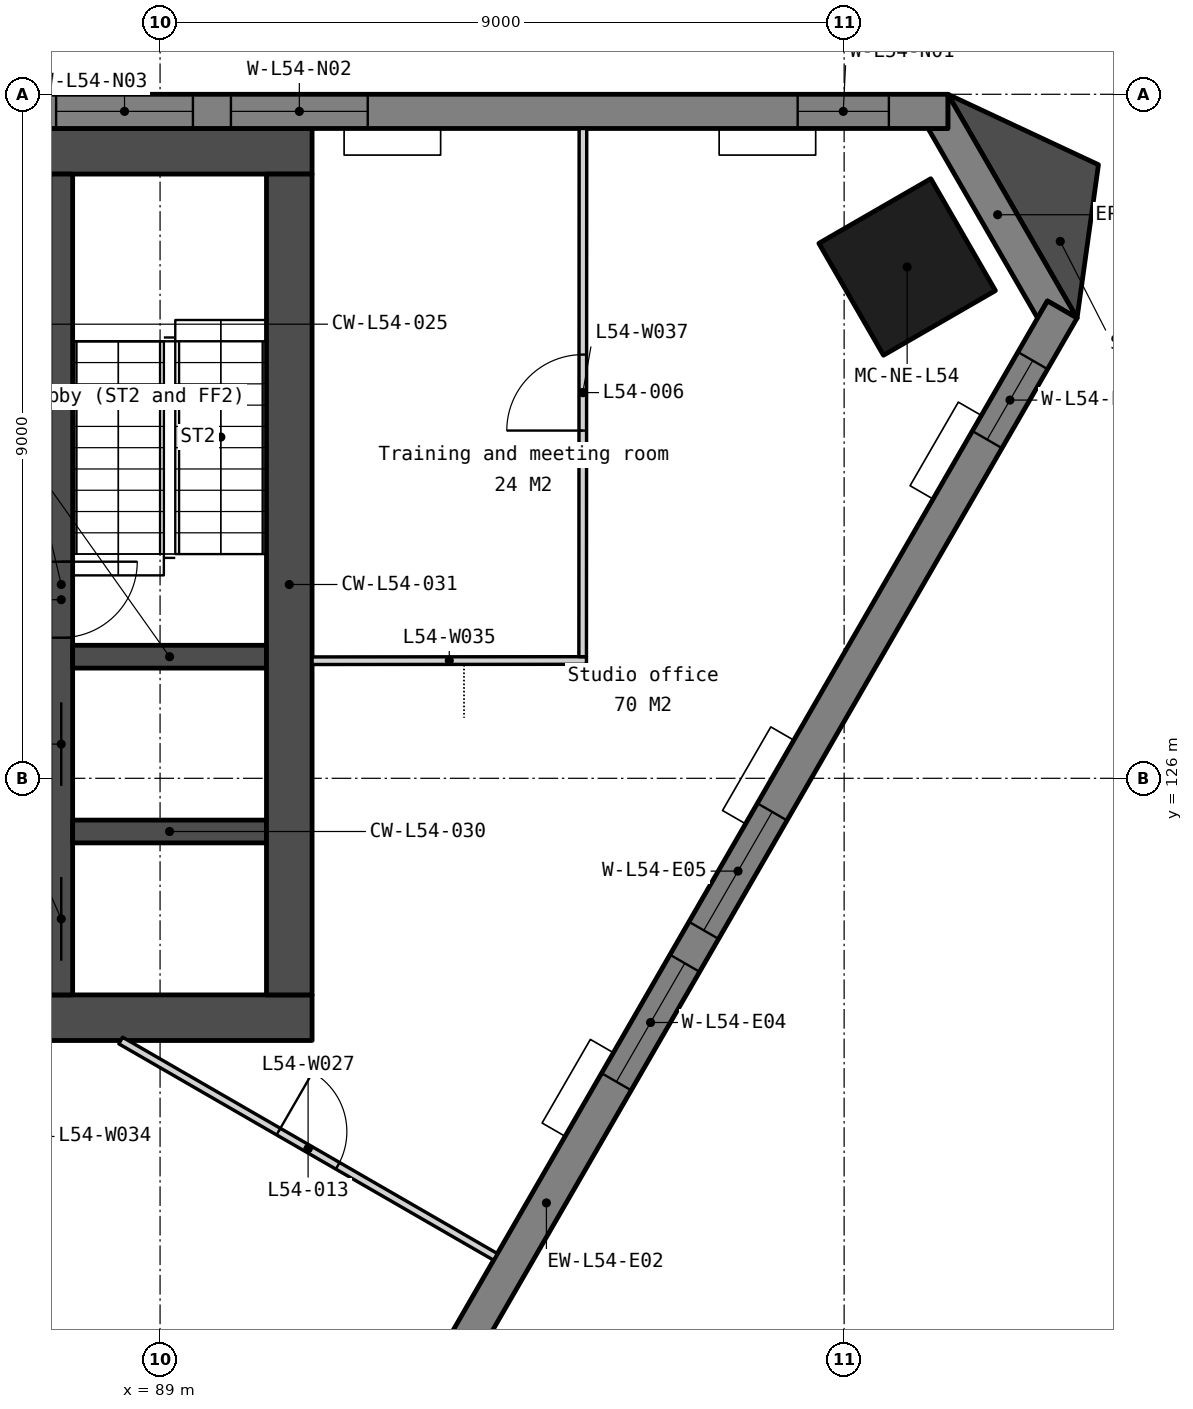
"""IFC4 building model, lengths in metres.
Left out: names, types, materials, properties, quantities, classifications, styles, units other than length and angle.
Written with IfcOpenShell. Run it as: python <this file> out.ifc"""

import sys

from ifc_helpers import new_model, si_unit, direction, frame, frame_2d, origin, origin_2d, place, context, subcontext, project, spatial, polyline, rectangle, outline, extrude, element, fill, save


model = new_model("IFC4")
c1 = context("Model", 3, precision=1e-05, world=origin(), true_north=direction((0.0, 1.0)))
c2 = subcontext(c1, "Body", "Model", "MODEL_VIEW")
j1 = project(units=[si_unit("LENGTHUNIT", "METRE"), si_unit("PLANEANGLEUNIT", "RADIAN")], contexts=[c1])
p1 = place(None, origin())
s1 = spatial("IfcSite", under=j1, at=p1, CompositionType="ELEMENT")
p2 = place(p1, origin())
s2 = spatial("IfcBuilding", under=s1, at=p2, CompositionType="ELEMENT")
p3 = place(p2, frame((0.0, 0.0, 215.3)))
s3 = spatial("IfcBuildingStorey", under=s2, at=p3, CompositionType="ELEMENT", Elevation=215.3)
p4 = place(p3, frame((98.829, 132.728, 0.0), z_axis=(0.0, 0.0, 1.0), x_axis=(-0.5, 0.866025403784, 0.0)))
e1 = element("IfcColumn", 1, at=p4, inside=s3, PredefinedType="COLUMN", context=c2, shape_type="SweptSolid", body=[
    extrude(rectangle(XDim=1.7, YDim=1.7, at=origin_2d()), origin(), (0.0, 0.0, 1.0), 3.9),
])
p5 = place(p3, frame((69.0, 134.25, 0.0), z_axis=(0.0, 0.0, 1.0), x_axis=(1.0, 0.0, 0.0)))
e2 = element("IfcWall", 2, at=p5, inside=s3, PredefinedType="SOLIDWALL", context=c2, shape_type="SweptSolid", body=[
    extrude(rectangle(XDim=22.0, YDim=0.6, at=frame_2d((11.0, 0.0))), origin(), (0.0, 0.0, 1.0), 3.75),
])
p6 = place(p3, frame((69.0, 122.85, 0.0), z_axis=(0.0, 0.0, 1.0), x_axis=(1.0, 0.0, 0.0)))
e3 = element("IfcWall", 3, at=p6, inside=s3, PredefinedType="SOLIDWALL", context=c2, shape_type="SweptSolid", body=[
    extrude(rectangle(XDim=22.0, YDim=0.6, at=frame_2d((11.0, 0.0))), origin(), (0.0, 0.0, 1.0), 3.75),
])
p7 = place(p6, frame((16.375, 0.0, 0.0)))
e4 = element("IfcOpeningElement", 4, at=p7, cuts=e3, PredefinedType="OPENING", context=c2, shape_type="SweptSolid", body=[
    extrude(rectangle(XDim=1.8, YDim=2.1, at=frame_2d((0.9, 1.05))), frame((0.0, 0.31, 0.0), z_axis=(0.0, -1.0, 0.0), x_axis=(1.0, 0.0, 0.0)), (0.0, 0.0, 1.0), 0.62),
])
p8 = place(p6, frame((3.825, 0.0, 0.0)))
e5 = element("IfcOpeningElement", 5, at=p8, cuts=e3, PredefinedType="OPENING", context=c2, shape_type="SweptSolid", body=[
    extrude(rectangle(XDim=1.8, YDim=2.1, at=frame_2d((0.9, 1.05))), frame((0.0, 0.31, 0.0), z_axis=(0.0, -1.0, 0.0), x_axis=(1.0, 0.0, 0.0)), (0.0, 0.0, 1.0), 0.62),
])
p9 = place(p6, frame((12.85, 0.0, 0.0)))
e6 = element("IfcOpeningElement", 6, at=p9, cuts=e3, PredefinedType="OPENING", context=c2, shape_type="SweptSolid", body=[
    extrude(rectangle(XDim=1.5, YDim=2.1, at=frame_2d((0.75, 1.05))), frame((0.0, 0.31, 0.0), z_axis=(0.0, -1.0, 0.0), x_axis=(1.0, 0.0, 0.0)), (0.0, 0.0, 1.0), 0.62),
])
p10 = place(p3, frame((87.7, 133.95, 0.0), z_axis=(0.0, 0.0, 1.0), x_axis=(0.0, -1.0, 0.0)))
e7 = element("IfcWall", 7, at=p10, inside=s3, PredefinedType="SOLIDWALL", context=c2, shape_type="SweptSolid", body=[
    extrude(rectangle(XDim=10.8, YDim=0.3, at=frame_2d((5.4, 0.0))), origin(), (0.0, 0.0, 1.0), 3.75),
])
p11 = place(p10, frame((6.95, 0.0, 0.0)))
e8 = element("IfcOpeningElement", 8, at=p11, cuts=e7, PredefinedType="OPENING", context=c2, shape_type="SweptSolid", body=[
    extrude(rectangle(XDim=1.1, YDim=2.1, at=frame_2d((0.55, 1.05))), frame((0.0, 0.16, 0.0), z_axis=(0.0, -1.0, 0.0), x_axis=(1.0, 0.0, 0.0)), (0.0, 0.0, 1.0), 0.32),
])
p12 = place(p10, frame((5.1, 0.0, 0.0)))
e9 = element("IfcOpeningElement", 9, at=p12, cuts=e7, PredefinedType="OPENING", context=c2, shape_type="SweptSolid", body=[
    extrude(rectangle(XDim=1.0, YDim=2.1, at=frame_2d((0.5, 1.05))), frame((0.0, 0.16, 0.0), z_axis=(0.0, -1.0, 0.0), x_axis=(1.0, 0.0, 0.0)), (0.0, 0.0, 1.0), 0.32),
])
p13 = place(p10, frame((9.25, 0.0, 0.0)))
e10 = element("IfcOpeningElement", 10, at=p13, cuts=e7, PredefinedType="OPENING", context=c2, shape_type="SweptSolid", body=[
    extrude(rectangle(XDim=1.1, YDim=2.1, at=frame_2d((0.55, 1.05))), frame((0.0, 0.16, 0.0), z_axis=(0.0, -1.0, 0.0), x_axis=(1.0, 0.0, 0.0)), (0.0, 0.0, 1.0), 0.32),
])
for number, where, z_axis, x_axis in (
    (11, (87.85, 127.6, 0.0), (0.0, 0.0, 1.0), (1.0, 0.0, 0.0)),
    (12, (87.85, 125.3, 0.0), (0.0, 0.0, 1.0), (1.0, 0.0, 0.0)),
):
    element("IfcWall", number, at=place(p3, frame(where, z_axis=z_axis, x_axis=x_axis)), inside=s3, PredefinedType="SOLIDWALL", context=c2, shape_type="SweptSolid", body=[
        extrude(rectangle(XDim=2.55, YDim=0.3, at=frame_2d((1.275, 0.0))), origin(), (0.0, 0.0, 1.0), 3.75),
    ])
p14 = place(p3, frame((90.7, 133.95, 0.0), z_axis=(0.0, 0.0, 1.0), x_axis=(0.0, -1.0, 0.0)))
e13 = element("IfcWall", 13, at=p14, inside=s3, PredefinedType="SOLIDWALL", context=c2, shape_type="SweptSolid", body=[
    extrude(rectangle(XDim=10.8, YDim=0.6, at=frame_2d((5.4, 0.0))), origin(), (0.0, 0.0, 1.0), 3.75),
])
p15 = place(p3, frame((0.0, 0.0, -0.15)))
e14 = element("IfcWall", 14, at=p15, inside=s3, PredefinedType="SOLIDWALL", context=c2, shape_type="SweptSolid", body=[
    extrude(outline(polyline([(101.065, 132.055), (100.675, 132.281), (100.545, 132.055), (99.105, 134.55), (99.365, 134.55), (99.365, 135.0), (101.065, 132.055)])), origin(), (0.0, 0.0, 1.0), 3.9),
])
p16 = place(p3, frame((99.365, 134.775, -0.15), z_axis=(0.0, 0.0, 1.0), x_axis=(-1.0, 0.0, 0.0)))
e15 = element("IfcWall", 15, at=p16, inside=s3, PredefinedType="SOLIDWALL", context=c2, shape_type="SweptSolid", body=[
    extrude(outline(polyline([(38.729, 0.0), (38.729, 3.9), (0.0, 3.9), (0.0, 0.0), (38.729, 0.0)])), frame((0.0, 0.225, 0.0), z_axis=(0.0, -1.0, 0.0), x_axis=(1.0, 0.0, 0.0)), (0.0, 0.0, 1.0), 0.45),
])
p17 = place(p16, frame((0.776, 0.0, 0.95)))
e16 = element("IfcOpeningElement", 16, at=p17, cuts=e15, PredefinedType="OPENING", context=c2, shape_type="SweptSolid", body=[
    extrude(rectangle(XDim=1.2, YDim=2.2, at=frame_2d((0.6, 1.1))), frame((0.0, 0.235, 0.0), z_axis=(0.0, -1.0, 0.0), x_axis=(1.0, 0.0, 0.0)), (0.0, 0.0, 1.0), 0.47),
])
p18 = place(p16, frame((7.632, 0.0, 0.95)))
e17 = element("IfcOpeningElement", 17, at=p18, cuts=e15, PredefinedType="OPENING", context=c2, shape_type="SweptSolid", body=[
    extrude(rectangle(XDim=1.8, YDim=2.2, at=frame_2d((0.9, 1.1))), frame((0.0, 0.235, 0.0), z_axis=(0.0, -1.0, 0.0), x_axis=(1.0, 0.0, 0.0)), (0.0, 0.0, 1.0), 0.47),
])
p19 = place(p16, frame((9.932, 0.0, 0.95)))
e18 = element("IfcOpeningElement", 18, at=p19, cuts=e15, PredefinedType="OPENING", context=c2, shape_type="SweptSolid", body=[
    extrude(rectangle(XDim=1.8, YDim=2.2, at=frame_2d((0.9, 1.1))), frame((0.0, 0.235, 0.0), z_axis=(0.0, -1.0, 0.0), x_axis=(1.0, 0.0, 0.0)), (0.0, 0.0, 1.0), 0.47),
])
p20 = place(p16, frame((17.315, 0.0, 0.95)))
e19 = element("IfcOpeningElement", 19, at=p20, cuts=e15, PredefinedType="OPENING", context=c2, shape_type="SweptSolid", body=[
    extrude(rectangle(XDim=1.8, YDim=2.2, at=frame_2d((0.9, 1.1))), frame((0.0, 0.235, 0.0), z_axis=(0.0, -1.0, 0.0), x_axis=(1.0, 0.0, 0.0)), (0.0, 0.0, 1.0), 0.47),
])
p21 = place(p16, frame((19.615, 0.0, 0.95)))
e20 = element("IfcOpeningElement", 20, at=p21, cuts=e15, PredefinedType="OPENING", context=c2, shape_type="SweptSolid", body=[
    extrude(rectangle(XDim=1.8, YDim=2.2, at=frame_2d((0.9, 1.1))), frame((0.0, 0.235, 0.0), z_axis=(0.0, -1.0, 0.0), x_axis=(1.0, 0.0, 0.0)), (0.0, 0.0, 1.0), 0.47),
])
p22 = place(p16, frame((26.997, 0.0, 0.95)))
e21 = element("IfcOpeningElement", 21, at=p22, cuts=e15, PredefinedType="OPENING", context=c2, shape_type="SweptSolid", body=[
    extrude(rectangle(XDim=1.8, YDim=2.2, at=frame_2d((0.9, 1.1))), frame((0.0, 0.235, 0.0), z_axis=(0.0, -1.0, 0.0), x_axis=(1.0, 0.0, 0.0)), (0.0, 0.0, 1.0), 0.47),
])
p23 = place(p16, frame((29.297, 0.0, 0.95)))
e22 = element("IfcOpeningElement", 22, at=p23, cuts=e15, PredefinedType="OPENING", context=c2, shape_type="SweptSolid", body=[
    extrude(rectangle(XDim=1.8, YDim=2.2, at=frame_2d((0.9, 1.1))), frame((0.0, 0.235, 0.0), z_axis=(0.0, -1.0, 0.0), x_axis=(1.0, 0.0, 0.0)), (0.0, 0.0, 1.0), 0.47),
])
p24 = place(p16, frame((36.753, 0.0, 0.95)))
e23 = element("IfcOpeningElement", 23, at=p24, cuts=e15, PredefinedType="OPENING", context=c2, shape_type="SweptSolid", body=[
    extrude(rectangle(XDim=1.2, YDim=2.2, at=frame_2d((0.6, 1.1))), frame((0.0, 0.235, 0.0), z_axis=(0.0, -1.0, 0.0), x_axis=(1.0, 0.0, 0.0)), (0.0, 0.0, 1.0), 0.47),
])
p25 = place(p3, frame((87.296, 108.658, -0.15), z_axis=(0.0, 0.0, 1.0), x_axis=(0.500003227337, 0.866023540472, 0.0)))
e24 = element("IfcWall", 24, at=p25, inside=s3, PredefinedType="SOLIDWALL", context=c2, shape_type="SweptSolid", body=[
    extrude(outline(polyline([(27.147, 3.9), (27.147, 0.0), (0.0, 0.0), (0.0, 3.9), (27.147, 3.9)])), frame((0.0, 0.225, 0.0), z_axis=(0.0, -1.0, 0.0), x_axis=(1.0, 0.0, 0.0)), (0.0, 0.0, 1.0), 0.45),
])
p26 = place(p25, frame((5.732, 0.0, 0.95)))
e25 = element("IfcOpeningElement", 25, at=p26, cuts=e24, PredefinedType="OPENING", context=c2, shape_type="SweptSolid", body=[
    extrude(rectangle(XDim=1.8, YDim=2.2, at=frame_2d((0.9, 1.1))), frame((0.0, 0.235, 0.0), z_axis=(0.0, -1.0, 0.0), x_axis=(1.0, 0.0, 0.0)), (0.0, 0.0, 1.0), 0.47),
])
p27 = place(p25, frame((8.032, 0.0, 0.95)))
e26 = element("IfcOpeningElement", 26, at=p27, cuts=e24, PredefinedType="OPENING", context=c2, shape_type="SweptSolid", body=[
    extrude(rectangle(XDim=1.8, YDim=2.2, at=frame_2d((0.9, 1.1))), frame((0.0, 0.235, 0.0), z_axis=(0.0, -1.0, 0.0), x_axis=(1.0, 0.0, 0.0)), (0.0, 0.0, 1.0), 0.47),
])
p28 = place(p25, frame((15.415, 0.0, 0.95)))
e27 = element("IfcOpeningElement", 27, at=p28, cuts=e24, PredefinedType="OPENING", context=c2, shape_type="SweptSolid", body=[
    extrude(rectangle(XDim=1.8, YDim=2.2, at=frame_2d((0.9, 1.1))), frame((0.0, 0.235, 0.0), z_axis=(0.0, -1.0, 0.0), x_axis=(1.0, 0.0, 0.0)), (0.0, 0.0, 1.0), 0.47),
])
p29 = place(p25, frame((17.715, 0.0, 0.95)))
e28 = element("IfcOpeningElement", 28, at=p29, cuts=e24, PredefinedType="OPENING", context=c2, shape_type="SweptSolid", body=[
    extrude(rectangle(XDim=1.8, YDim=2.2, at=frame_2d((0.9, 1.1))), frame((0.0, 0.235, 0.0), z_axis=(0.0, -1.0, 0.0), x_axis=(1.0, 0.0, 0.0)), (0.0, 0.0, 1.0), 0.47),
])
p30 = place(p25, frame((25.171, 0.0, 0.95)))
e29 = element("IfcOpeningElement", 29, at=p30, cuts=e24, PredefinedType="OPENING", context=c2, shape_type="SweptSolid", body=[
    extrude(rectangle(XDim=1.2, YDim=2.2, at=frame_2d((0.6, 1.1))), frame((0.0, 0.235, 0.0), z_axis=(0.0, -1.0, 0.0), x_axis=(1.0, 0.0, 0.0)), (0.0, 0.0, 1.0), 0.47),
])
p31 = place(p3, frame((0.0, 0.0, -0.15)))
e30 = element("IfcWall", 30, at=p31, inside=s3, PredefinedType="SOLIDWALL", context=c2, shape_type="SweptSolid", body=[
    extrude(outline(polyline([(101.065, 132.055), (101.346, 134.073), (99.365, 135.0), (101.065, 132.055)])), origin(), (0.0, 0.0, 1.0), 3.9),
])
p32 = place(p3, frame((84.346, 119.348, 0.0), z_axis=(0.0, 0.0, 1.0), x_axis=(0.866037793621, -0.49997853956, 0.0)))
e31 = element("IfcWall", 31, at=p32, inside=s3, PredefinedType="PARTITIONING", context=c2, shape_type="SweptSolid", body=[
    extrude(rectangle(XDim=6.162, YDim=0.2, at=frame_2d((3.081, 0.0))), origin(), (0.0, 0.0, 1.0), 3.75),
])
p33 = place(p3, frame((88.482, 122.55, 0.0), z_axis=(0.0, 0.0, 1.0), x_axis=(0.866023511746, -0.500003277092, 0.0)))
e32 = element("IfcWall", 32, at=p33, inside=s3, PredefinedType="PARTITIONING", context=c2, shape_type="SweptSolid", body=[
    extrude(rectangle(XDim=5.694, YDim=0.1, at=frame_2d((2.847, 0.0))), origin(), (0.0, 0.0, 1.0), 3.75),
])
p34 = place(p33, frame((2.397, 0.0, 0.0)))
e33 = element("IfcOpeningElement", 33, at=p34, cuts=e32, PredefinedType="OPENING", context=c2, shape_type="SweptSolid", body=[
    extrude(rectangle(XDim=0.9, YDim=2.1, at=frame_2d((0.45, 1.05))), frame((0.0, 0.06, 0.0), z_axis=(0.0, -1.0, 0.0), x_axis=(1.0, 0.0, 0.0)), (0.0, 0.0, 1.0), 0.12),
])
p35 = place(p3, frame((91.0, 127.547, 0.0), z_axis=(0.0, 0.0, 1.0), x_axis=(0.99999967067, 0.000811578253, 0.0)))
e34 = element("IfcWall", 34, at=p35, inside=s3, PredefinedType="PARTITIONING", context=c2, shape_type="SweptSolid", body=[
    extrude(rectangle(XDim=3.61, YDim=0.1, at=frame_2d((1.805, 0.0))), origin(), (0.0, 0.0, 1.0), 3.75),
])
p36 = place(p3, frame((94.56, 127.6, 0.0), z_axis=(0.0, 0.0, 1.0), x_axis=(0.000491814737, 0.999999879059, 0.0)))
e35 = element("IfcWall", 35, at=p36, inside=s3, PredefinedType="PARTITIONING", context=c2, shape_type="SweptSolid", body=[
    extrude(rectangle(XDim=6.95, YDim=0.1, at=frame_2d((3.475, 0.0))), origin(), (0.0, 0.0, 1.0), 3.75),
])
p37 = place(p36, frame((2.975, 0.0, 0.0)))
e36 = element("IfcOpeningElement", 36, at=p37, cuts=e35, PredefinedType="OPENING", context=c2, shape_type="SweptSolid", body=[
    extrude(rectangle(XDim=1.0, YDim=2.1, at=frame_2d((0.5, 1.05))), frame((0.0, 0.06, 0.0), z_axis=(0.0, -1.0, 0.0), x_axis=(1.0, 0.0, 0.0)), (0.0, 0.0, 1.0), 0.12),
])
p38 = place(p11, origin())
e37 = element("IfcDoor", 37, at=p38, inside=s3, OperationType="SLIDING_TO_LEFT", PredefinedType="DOOR", context=c2, shape_type="SweptSolid", body=[
    extrude(rectangle(XDim=1.1, YDim=2.1, at=frame_2d((0.55, 1.05))), frame((0.0, 0.025, 0.0), z_axis=(0.0, -1.0, 0.0), x_axis=(1.0, 0.0, 0.0)), (0.0, 0.0, 1.0), 0.05),
])
fill(e8, e37)
p39 = place(p12, origin())
e38 = element("IfcDoor", 38, at=p39, inside=s3, OperationType="SINGLE_SWING_LEFT", PredefinedType="DOOR", context=c2, shape_type="SweptSolid", body=[
    extrude(rectangle(XDim=1.0, YDim=2.1, at=frame_2d((0.5, 1.05))), frame((0.0, 0.025, 0.0), z_axis=(0.0, -1.0, 0.0), x_axis=(1.0, 0.0, 0.0)), (0.0, 0.0, 1.0), 0.05),
])
fill(e9, e38)
p40 = place(p13, origin())
e39 = element("IfcDoor", 39, at=p40, inside=s3, OperationType="SLIDING_TO_LEFT", PredefinedType="DOOR", context=c2, shape_type="SweptSolid", body=[
    extrude(rectangle(XDim=1.1, YDim=2.1, at=frame_2d((0.55, 1.05))), frame((0.0, 0.025, 0.0), z_axis=(0.0, -1.0, 0.0), x_axis=(1.0, 0.0, 0.0)), (0.0, 0.0, 1.0), 0.05),
])
fill(e10, e39)
p41 = place(p17, origin())
e40 = element("IfcWindow", 40, at=p41, inside=s3, PartitioningType="SINGLE_PANEL", PredefinedType="WINDOW", context=c2, shape_type="SweptSolid", body=[
    extrude(rectangle(XDim=1.2, YDim=2.2, at=frame_2d((0.6, 1.1))), frame((0.0, 0.03, 0.0), z_axis=(0.0, -1.0, 0.0), x_axis=(1.0, 0.0, 0.0)), (0.0, 0.0, 1.0), 0.06),
])
fill(e16, e40)
p42 = place(p18, origin())
e41 = element("IfcWindow", 41, at=p42, inside=s3, PartitioningType="SINGLE_PANEL", PredefinedType="WINDOW", context=c2, shape_type="SweptSolid", body=[
    extrude(rectangle(XDim=1.8, YDim=2.2, at=frame_2d((0.9, 1.1))), frame((0.0, 0.03, 0.0), z_axis=(0.0, -1.0, 0.0), x_axis=(1.0, 0.0, 0.0)), (0.0, 0.0, 1.0), 0.06),
])
fill(e17, e41)
p43 = place(p19, origin())
e42 = element("IfcWindow", 42, at=p43, inside=s3, PartitioningType="SINGLE_PANEL", PredefinedType="WINDOW", context=c2, shape_type="SweptSolid", body=[
    extrude(rectangle(XDim=1.8, YDim=2.2, at=frame_2d((0.9, 1.1))), frame((0.0, 0.03, 0.0), z_axis=(0.0, -1.0, 0.0), x_axis=(1.0, 0.0, 0.0)), (0.0, 0.0, 1.0), 0.06),
])
fill(e18, e42)
p44 = place(p28, origin())
e43 = element("IfcWindow", 43, at=p44, inside=s3, PartitioningType="SINGLE_PANEL", PredefinedType="WINDOW", context=c2, shape_type="SweptSolid", body=[
    extrude(rectangle(XDim=1.8, YDim=2.2, at=frame_2d((0.9, 1.1))), frame((0.0, 0.03, 0.0), z_axis=(0.0, -1.0, 0.0), x_axis=(1.0, 0.0, 0.0)), (0.0, 0.0, 1.0), 0.06),
])
fill(e27, e43)
p45 = place(p29, origin())
e44 = element("IfcWindow", 44, at=p45, inside=s3, PartitioningType="SINGLE_PANEL", PredefinedType="WINDOW", context=c2, shape_type="SweptSolid", body=[
    extrude(rectangle(XDim=1.8, YDim=2.2, at=frame_2d((0.9, 1.1))), frame((0.0, 0.03, 0.0), z_axis=(0.0, -1.0, 0.0), x_axis=(1.0, 0.0, 0.0)), (0.0, 0.0, 1.0), 0.06),
])
fill(e28, e44)
p46 = place(p30, origin())
e45 = element("IfcWindow", 45, at=p46, inside=s3, PartitioningType="SINGLE_PANEL", PredefinedType="WINDOW", context=c2, shape_type="SweptSolid", body=[
    extrude(rectangle(XDim=1.2, YDim=2.2, at=frame_2d((0.6, 1.1))), frame((0.0, 0.03, 0.0), z_axis=(0.0, -1.0, 0.0), x_axis=(1.0, 0.0, 0.0)), (0.0, 0.0, 1.0), 0.06),
])
fill(e29, e45)
p47 = place(p37, origin())
e46 = element("IfcDoor", 46, at=p47, inside=s3, OperationType="SINGLE_SWING_LEFT", PredefinedType="DOOR", context=c2, shape_type="SweptSolid", body=[
    extrude(rectangle(XDim=1.0, YDim=2.1, at=frame_2d((0.5, 1.05))), frame((0.0, 0.025, 0.0), z_axis=(0.0, -1.0, 0.0), x_axis=(1.0, 0.0, 0.0)), (0.0, 0.0, 1.0), 0.05),
])
fill(e36, e46)
p48 = place(p34, origin())
e47 = element("IfcDoor", 47, at=p48, inside=s3, OperationType="SINGLE_SWING_LEFT", PredefinedType="DOOR", context=c2, shape_type="SweptSolid", body=[
    extrude(rectangle(XDim=0.9, YDim=2.1, at=frame_2d((0.45, 1.05))), frame((0.0, 0.025, 0.0), z_axis=(0.0, -1.0, 0.0), x_axis=(1.0, 0.0, 0.0)), (0.0, 0.0, 1.0), 0.05),
])
fill(e33, e47)
save(model, sys.argv[1])
